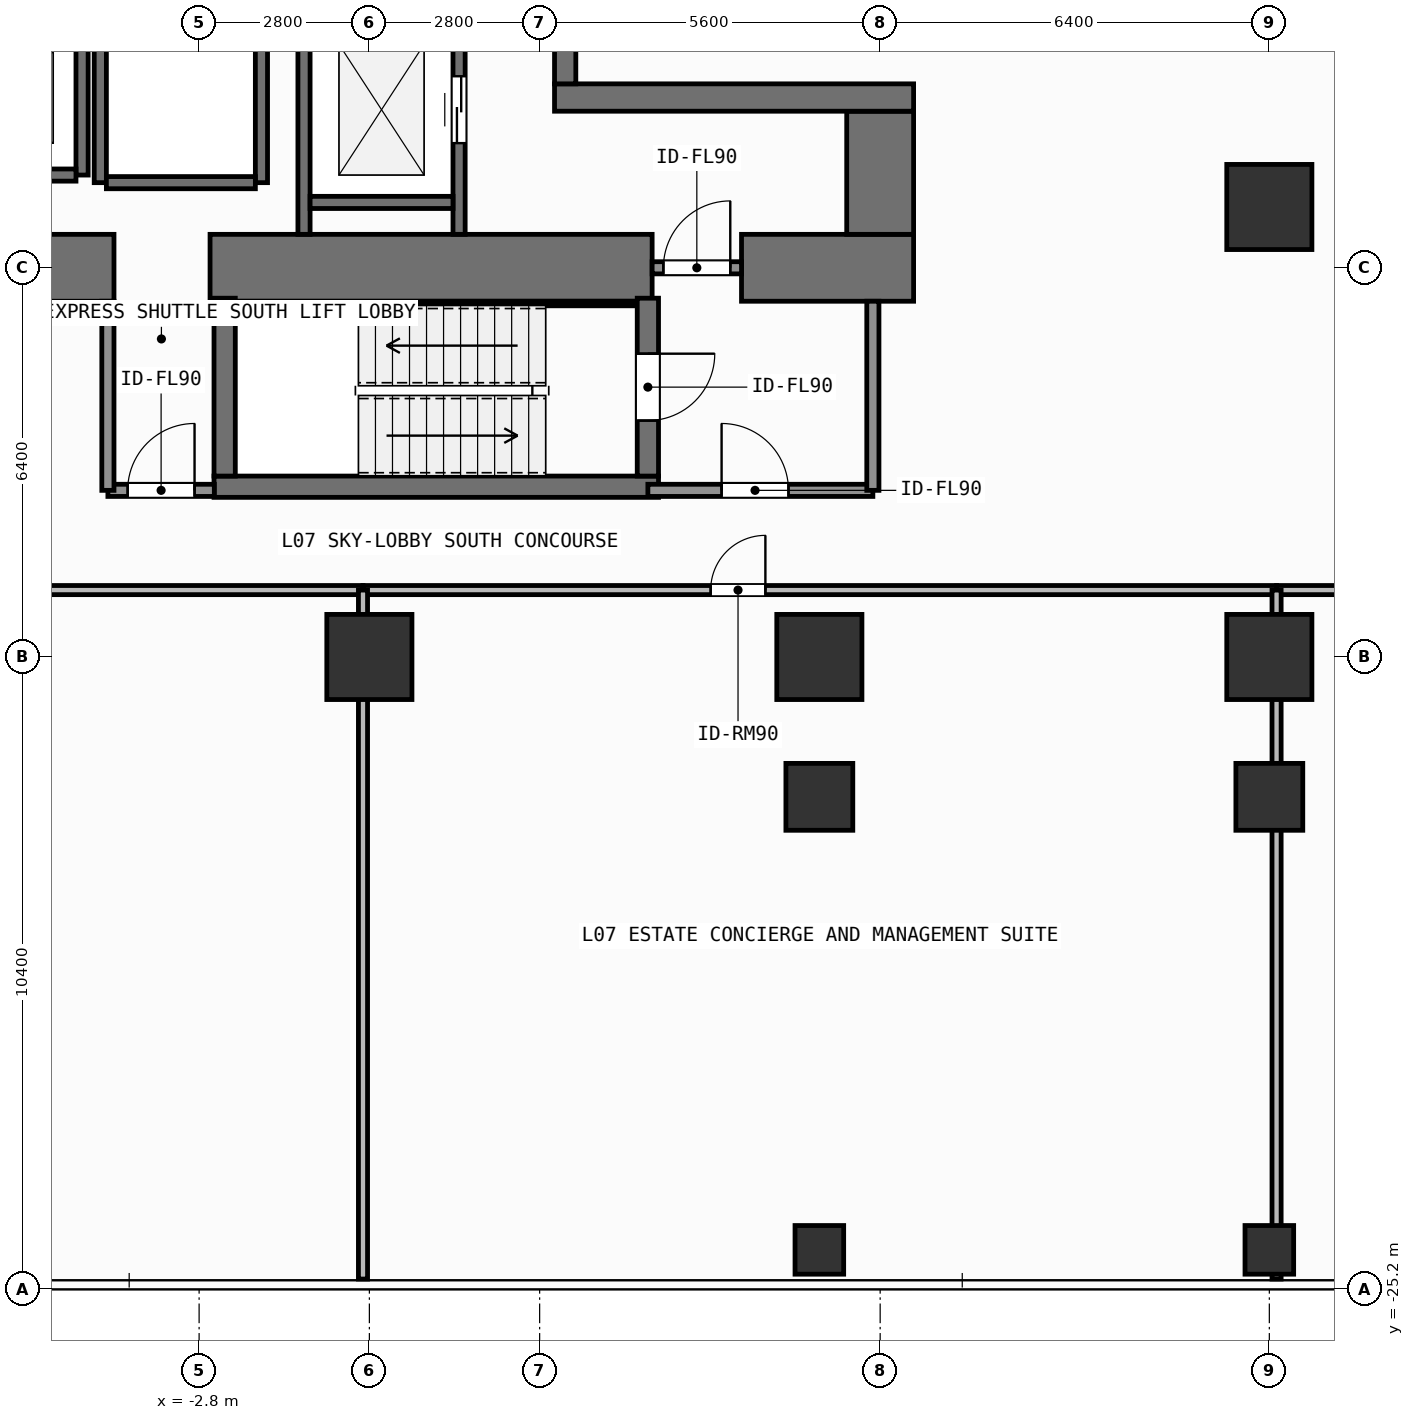
"""IFC4 building model, lengths in metres.
Left out: names, types, materials, properties, quantities, classifications, styles, units other than length and angle.
Written with IfcOpenShell. Run it as: python <this file> out.ifc"""

import sys

from ifc_helpers import new_model, si_unit, direction, frame, frame_2d, origin, origin_2d, place, context, subcontext, project, spatial, rectangle, hollow_rectangle, extrude, element, fill, save


model = new_model("IFC4")
c1 = context("Model", 3, precision=1e-05, world=origin(), true_north=direction((0.0, 1.0)))
c2 = subcontext(c1, "Body", "Model", "MODEL_VIEW")
j1 = project(units=[si_unit("LENGTHUNIT", "METRE"), si_unit("PLANEANGLEUNIT", "RADIAN")], contexts=[c1])
p1 = place(None, origin())
s1 = spatial("IfcSite", under=j1, at=p1, CompositionType="ELEMENT")
p2 = place(p1, origin())
s2 = spatial("IfcBuilding", under=s1, at=p2, CompositionType="ELEMENT")
p3 = place(p2, frame((0.0, 0.0, 26.4)))
s3 = spatial("IfcBuildingStorey", under=s2, at=p3, CompositionType="ELEMENT", Elevation=26.4)
p4 = place(p3, frame((-7.55, -8.4, 0.0), z_axis=(0.0, 0.0, 1.0), x_axis=(1.0, 0.0, 0.0)))
e1 = element("IfcWall", 1, at=p4, inside=s3, PredefinedType="SHEAR", context=c2, shape_type="SweptSolid", body=[
    extrude(rectangle(XDim=3.35, YDim=1.1, at=frame_2d((1.675, 0.0))), origin(), (0.0, 0.0, 1.0), 4.2),
])
p5 = place(p3, frame((-2.62, -8.4, 0.0), z_axis=(0.0, 0.0, 1.0), x_axis=(1.0, 0.0, 0.0)))
e2 = element("IfcWall", 2, at=p5, inside=s3, PredefinedType="SHEAR", context=c2, shape_type="SweptSolid", body=[
    extrude(rectangle(XDim=7.27, YDim=1.1, at=frame_2d((3.635, 0.0))), origin(), (0.0, 0.0, 1.0), 4.2),
])
p6 = place(p3, frame((6.12, -8.4, 0.0), z_axis=(0.0, 0.0, 1.0), x_axis=(1.0, 0.0, 0.0)))
e3 = element("IfcWall", 3, at=p6, inside=s3, PredefinedType="SHEAR", context=c2, shape_type="SweptSolid", body=[
    extrude(rectangle(XDim=2.83, YDim=1.1, at=frame_2d((1.415, 0.0))), origin(), (0.0, 0.0, 1.0), 4.2),
])
p7 = place(p3, frame((8.4, -7.85, 0.0), z_axis=(0.0, 0.0, 1.0), x_axis=(0.0, 1.0, 0.0)))
e4 = element("IfcWall", 4, at=p7, inside=s3, PredefinedType="SHEAR", context=c2, shape_type="SweptSolid", body=[
    extrude(rectangle(XDim=2.025, YDim=1.1, at=frame_2d((1.013, 0.0))), origin(), (0.0, 0.0, 1.0), 4.2),
])
p8 = place(p3, frame((3.045, -5.6, 0.0), z_axis=(0.0, 0.0, 1.0), x_axis=(1.0, 0.0, 0.0)))
e5 = element("IfcWall", 5, at=p8, inside=s3, PredefinedType="SHEAR", context=c2, shape_type="SweptSolid", body=[
    extrude(rectangle(XDim=5.905, YDim=0.45, at=frame_2d((2.953, 0.0))), origin(), (0.0, 0.0, 1.0), 4.2),
])
p9 = place(p3, frame((3.22, -5.375, 0.0), z_axis=(0.0, 0.0, 1.0), x_axis=(0.0, 1.0, 0.0)))
e6 = element("IfcWall", 6, at=p9, inside=s3, PredefinedType="SHEAR", context=c2, shape_type="SweptSolid", body=[
    extrude(rectangle(XDim=10.75, YDim=0.35, at=frame_2d((5.375, 0.0))), origin(), (0.0, 0.0, 1.0), 4.2),
])
p10 = place(p3, frame((-2.555, -12.0, 0.0), z_axis=(0.0, 0.0, 1.0), x_axis=(1.0, 0.0, 0.0)))
e7 = element("IfcWall", 7, at=p10, inside=s3, PredefinedType="SHEAR", context=c2, shape_type="SweptSolid", body=[
    extrude(rectangle(XDim=7.31, YDim=0.35, at=frame_2d((3.655, 0.0))), origin(), (0.0, 0.0, 1.0), 4.2),
])
p11 = place(p3, frame((-2.2, -8.988, 0.0), z_axis=(0.0, 0.0, 1.0), x_axis=(1.0, 0.0, 0.0)))
e8 = element("IfcWall", 8, at=p11, inside=s3, PredefinedType="SHEAR", context=c2, shape_type="SweptSolid", body=[
    extrude(rectangle(XDim=6.6, YDim=0.075, at=frame_2d((3.3, 0.0))), origin(), (0.0, 0.0, 1.0), 4.2),
])
p12 = place(p3, frame((-2.38, -11.825, 0.0), z_axis=(0.0, 0.0, 1.0), x_axis=(0.0, 1.0, 0.0)))
e9 = element("IfcWall", 9, at=p12, inside=s3, PredefinedType="SHEAR", context=c2, shape_type="SweptSolid", body=[
    extrude(rectangle(XDim=2.925, YDim=0.35, at=frame_2d((1.462, 0.0))), origin(), (0.0, 0.0, 1.0), 4.2),
])
p13 = place(p3, frame((4.58, -8.9, 0.0), z_axis=(0.0, 0.0, 1.0), x_axis=(0.0, -1.0, 0.0)))
e10 = element("IfcWall", 10, at=p13, inside=s3, PredefinedType="SHEAR", context=c2, shape_type="SweptSolid", body=[
    extrude(rectangle(XDim=2.925, YDim=0.35, at=frame_2d((1.462, 0.0))), origin(), (0.0, 0.0, 1.0), 4.2),
])
p14 = place(p13, frame((0.913, 0.0, 0.0)))
e11 = element("IfcOpeningElement", 11, at=p14, cuts=e10, PredefinedType="OPENING", context=c2, shape_type="SweptSolid", body=[
    extrude(rectangle(XDim=1.1, YDim=2.15, at=frame_2d((0.55, 1.075))), frame((0.0, 0.185, 0.0), z_axis=(0.0, -1.0, 0.0), x_axis=(1.0, 0.0, 0.0)), (0.0, 0.0, 1.0), 0.37),
])
for number, where, z_axis, x_axis in (
    (12, (0.0, -14.8, 0.0), (0.0, 0.0, 1.0), (1.0, 0.0, 0.0)),
    (13, (7.4, -14.8, 0.0), (0.0, 0.0, 1.0), (1.0, 0.0, 0.0)),
    (14, (14.8, -14.8, 0.0), (0.0, 0.0, 1.0), (1.0, 0.0, 0.0)),
    (15, (14.8, -7.4, 0.0), (0.0, 0.0, 1.0), (1.0, 0.0, 0.0)),
):
    element("IfcColumn", number, at=place(p3, frame(where, z_axis=z_axis, x_axis=x_axis)), inside=s3, PredefinedType="COLUMN", context=c2, shape_type="SweptSolid", body=[
        extrude(rectangle(XDim=1.4, YDim=1.4, at=origin_2d()), origin(), (0.0, 0.0, 1.0), 4.2),
    ])
for number, where, z_axis, x_axis in (
    (16, (7.4, -17.1, 0.0), (0.0, 0.0, 1.0), (1.0, 0.0, 0.0)),
    (17, (14.8, -17.1, 0.0), (0.0, 0.0, 1.0), (1.0, 0.0, 0.0)),
):
    element("IfcColumn", number, at=place(p3, frame(where, z_axis=z_axis, x_axis=x_axis)), inside=s3, PredefinedType="COLUMN", context=c2, shape_type="SweptSolid", body=[
        extrude(rectangle(XDim=1.1, YDim=1.1, at=origin_2d()), origin(), (0.0, 0.0, 1.0), 4.2),
    ])
for number, where, z_axis, x_axis in (
    (18, (7.4, -24.55, 0.0), (0.0, 0.0, 1.0), (1.0, 0.0, 0.0)),
    (19, (14.8, -24.55, 0.0), (0.0, 0.0, 1.0), (1.0, 0.0, 0.0)),
):
    element("IfcColumn", number, at=place(p3, frame(where, z_axis=z_axis, x_axis=x_axis)), inside=s3, PredefinedType="COLUMN", context=c2, shape_type="SweptSolid", body=[
        extrude(hollow_rectangle(XDim=0.8, YDim=0.8, WallThickness=0.036, at=origin_2d()), origin(), (0.0, 0.0, 1.0), 4.2),
    ])
p15 = place(p3, frame((-4.725, -6.875, 0.0), z_axis=(0.0, 0.0, 1.0), x_axis=(0.0, 1.0, 0.0)))
e20 = element("IfcWall", 20, at=p15, inside=s3, PredefinedType="SHEAR", context=c2, shape_type="SweptSolid", body=[
    extrude(rectangle(XDim=2.55, YDim=0.2, at=frame_2d((1.275, 0.0))), origin(), (0.0, 0.0, 1.0), 3.98),
])
p16 = place(p3, frame((-7.175, -6.875, 0.0), z_axis=(0.0, 0.0, 1.0), x_axis=(1.0, 0.0, 0.0)))
e21 = element("IfcWall", 21, at=p16, inside=s3, PredefinedType="SHEAR", context=c2, shape_type="SweptSolid", body=[
    extrude(rectangle(XDim=2.35, YDim=0.2, at=frame_2d((1.175, 0.0))), origin(), (0.0, 0.0, 1.0), 3.98),
])
for number, where, z_axis, x_axis in (
    (22, (-4.425, -7.0, 0.0), (0.0, 0.0, 1.0), (0.0, 1.0, 0.0)),
    (23, (-1.775, -7.0, 0.0), (0.0, 0.0, 1.0), (0.0, 1.0, 0.0)),
):
    element("IfcWall", number, at=place(p3, frame(where, z_axis=z_axis, x_axis=x_axis)), inside=s3, PredefinedType="SHEAR", context=c2, shape_type="SweptSolid", body=[
        extrude(rectangle(XDim=2.8, YDim=0.2, at=frame_2d((1.4, 0.0))), origin(), (0.0, 0.0, 1.0), 3.98),
    ])
p17 = place(p3, frame((-4.325, -7.0, 0.0), z_axis=(0.0, 0.0, 1.0), x_axis=(1.0, 0.0, 0.0)))
e24 = element("IfcWall", 24, at=p17, inside=s3, PredefinedType="SHEAR", context=c2, shape_type="SweptSolid", body=[
    extrude(rectangle(XDim=2.45, YDim=0.2, at=frame_2d((1.225, 0.0))), origin(), (0.0, 0.0, 1.0), 3.98),
])
p18 = place(p3, frame((-1.075, -7.85, 0.0), z_axis=(0.0, 0.0, 1.0), x_axis=(0.0, 1.0, 0.0)))
e25 = element("IfcWall", 25, at=p18, inside=s3, PredefinedType="SHEAR", context=c2, shape_type="SweptSolid", body=[
    extrude(rectangle(XDim=3.575, YDim=0.2, at=frame_2d((1.788, 0.0))), origin(), (0.0, 0.0, 1.0), 3.98),
])
p19 = place(p3, frame((1.475, -7.85, 0.0), z_axis=(0.0, 0.0, 1.0), x_axis=(0.0, 1.0, 0.0)))
e26 = element("IfcWall", 26, at=p19, inside=s3, PredefinedType="SHEAR", context=c2, shape_type="SweptSolid", body=[
    extrude(rectangle(XDim=3.575, YDim=0.2, at=frame_2d((1.788, 0.0))), origin(), (0.0, 0.0, 1.0), 3.98),
])
p20 = place(p19, frame((1.5, 0.0, 0.0)))
e27 = element("IfcOpeningElement", 27, at=p20, cuts=e26, PredefinedType="OPENING", context=c2, shape_type="SweptSolid", body=[
    extrude(rectangle(XDim=1.1, YDim=2.2, at=frame_2d((0.55, 1.1))), frame((0.0, 0.11, 0.0), z_axis=(0.0, -1.0, 0.0), x_axis=(1.0, 0.0, 0.0)), (0.0, 0.0, 1.0), 0.22),
])
p21 = place(p3, frame((-0.975, -7.325, 0.0), z_axis=(0.0, 0.0, 1.0), x_axis=(1.0, 0.0, 0.0)))
e28 = element("IfcWall", 28, at=p21, inside=s3, PredefinedType="SHEAR", context=c2, shape_type="SweptSolid", body=[
    extrude(rectangle(XDim=2.35, YDim=0.2, at=frame_2d((1.175, 0.0))), origin(), (0.0, 0.0, 1.0), 3.98),
])
p22 = place(p3, frame((4.58, -12.06, 0.0), z_axis=(0.0, 0.0, 1.0), x_axis=(1.0, 0.0, 0.0)))
e29 = element("IfcWall", 29, at=p22, inside=s3, PredefinedType="SOLIDWALL", context=c2, shape_type="SweptSolid", body=[
    extrude(rectangle(XDim=3.7, YDim=0.2, at=frame_2d((1.85, 0.0))), origin(), (0.0, 0.0, 1.0), 3.98),
])
p23 = place(p22, frame((1.212, 0.0, 0.0)))
e30 = element("IfcOpeningElement", 30, at=p23, cuts=e29, PredefinedType="OPENING", context=c2, shape_type="SweptSolid", body=[
    extrude(rectangle(XDim=1.1, YDim=2.15, at=frame_2d((0.55, 1.075))), frame((0.0, 0.11, 0.0), z_axis=(0.0, -1.0, 0.0), x_axis=(1.0, 0.0, 0.0)), (0.0, 0.0, 1.0), 0.22),
])
p24 = place(p3, frame((4.65, -8.4, 0.0), z_axis=(0.0, 0.0, 1.0), x_axis=(1.0, 0.0, 0.0)))
e31 = element("IfcWall", 31, at=p24, inside=s3, PredefinedType="SOLIDWALL", context=c2, shape_type="SweptSolid", body=[
    extrude(rectangle(XDim=1.47, YDim=0.2, at=frame_2d((0.735, 0.0))), origin(), (0.0, 0.0, 1.0), 3.02),
])
p25 = place(p24, frame((0.185, 0.0, 0.0)))
e32 = element("IfcOpeningElement", 32, at=p25, cuts=e31, PredefinedType="OPENING", context=c2, shape_type="SweptSolid", body=[
    extrude(rectangle(XDim=1.1, YDim=2.15, at=frame_2d((0.55, 1.075))), frame((0.0, 0.11, 0.0), z_axis=(0.0, -1.0, 0.0), x_axis=(1.0, 0.0, 0.0)), (0.0, 0.0, 1.0), 0.22),
])
p26 = place(p3, frame((-4.3, -12.06, 0.0), z_axis=(0.0, 0.0, 1.0), x_axis=(1.0, 0.0, 0.0)))
e33 = element("IfcWall", 33, at=p26, inside=s3, PredefinedType="SOLIDWALL", context=c2, shape_type="SweptSolid", body=[
    extrude(rectangle(XDim=1.75, YDim=0.2, at=frame_2d((0.875, 0.0))), origin(), (0.0, 0.0, 1.0), 3.98),
])
p27 = place(p26, frame((0.325, 0.0, 0.0)))
e34 = element("IfcOpeningElement", 34, at=p27, cuts=e33, PredefinedType="OPENING", context=c2, shape_type="SweptSolid", body=[
    extrude(rectangle(XDim=1.1, YDim=2.15, at=frame_2d((0.55, 1.075))), frame((0.0, 0.11, 0.0), z_axis=(0.0, -1.0, 0.0), x_axis=(1.0, 0.0, 0.0)), (0.0, 0.0, 1.0), 0.22),
])
p28 = place(p3, frame((-22.13, -13.7, 0.0), z_axis=(0.0, 0.0, 1.0), x_axis=(1.0, 0.0, 0.0)))
e35 = element("IfcWall", 35, at=p28, inside=s3, PredefinedType="PARTITIONING", context=c2, shape_type="SweptSolid", body=[
    extrude(rectangle(XDim=22.025, YDim=0.15, at=frame_2d((11.012, 0.0))), origin(), (0.0, 0.0, 1.0), 3.98),
])
p29 = place(p28, frame((12.367, 0.0, 0.0)))
e36 = element("IfcOpeningElement", 36, at=p29, cuts=e35, PredefinedType="OPENING", context=c2, shape_type="SweptSolid", body=[
    extrude(rectangle(XDim=1.6, YDim=2.3, at=frame_2d((0.8, 1.15))), frame((0.0, 0.085, 0.0), z_axis=(0.0, -1.0, 0.0), x_axis=(1.0, 0.0, 0.0)), (0.0, 0.0, 1.0), 0.17),
])
p30 = place(p3, frame((-0.105, -13.7, 0.0), z_axis=(0.0, 0.0, 1.0), x_axis=(1.0, 0.0, 0.0)))
e37 = element("IfcWall", 37, at=p30, inside=s3, PredefinedType="PARTITIONING", context=c2, shape_type="SweptSolid", body=[
    extrude(rectangle(XDim=15.024, YDim=0.15, at=frame_2d((7.512, 0.0))), origin(), (0.0, 0.0, 1.0), 3.98),
])
p31 = place(p30, frame((5.718, 0.0, 0.0)))
e38 = element("IfcOpeningElement", 38, at=p31, cuts=e37, PredefinedType="OPENING", context=c2, shape_type="SweptSolid", body=[
    extrude(rectangle(XDim=0.9, YDim=2.1, at=frame_2d((0.45, 1.05))), frame((0.0, 0.085, 0.0), z_axis=(0.0, -1.0, 0.0), x_axis=(1.0, 0.0, 0.0)), (0.0, 0.0, 1.0), 0.17),
])
p32 = place(p3, frame((14.919, -13.7, 0.0), z_axis=(0.0, 0.0, 1.0), x_axis=(1.0, 0.0, 0.0)))
e39 = element("IfcWall", 39, at=p32, inside=s3, PredefinedType="PARTITIONING", context=c2, shape_type="SweptSolid", body=[
    extrude(rectangle(XDim=13.011, YDim=0.15, at=frame_2d((6.505, 0.0))), origin(), (0.0, 0.0, 1.0), 3.98),
])
p33 = place(p32, frame((5.162, 0.0, 0.0)))
e40 = element("IfcOpeningElement", 40, at=p33, cuts=e39, PredefinedType="OPENING", context=c2, shape_type="SweptSolid", body=[
    extrude(rectangle(XDim=0.9, YDim=2.1, at=frame_2d((0.45, 1.05))), frame((0.0, 0.085, 0.0), z_axis=(0.0, -1.0, 0.0), x_axis=(1.0, 0.0, 0.0)), (0.0, 0.0, 1.0), 0.17),
])
for number, where, z_axis, x_axis in (
    (41, (8.28, -12.06, 0.0), (0.0, 0.0, 1.0), (0.0, 1.0, 0.0)),
    (42, (-4.3, -12.06, 0.0), (0.0, 0.0, 1.0), (0.0, 1.0, 0.0)),
):
    element("IfcWall", number, at=place(p3, frame(where, z_axis=z_axis, x_axis=x_axis)), inside=s3, PredefinedType="SOLIDWALL", context=c2, shape_type="SweptSolid", body=[
        extrude(rectangle(XDim=3.11, YDim=0.2, at=frame_2d((1.555, 0.0))), origin(), (0.0, 0.0, 1.0), 3.98),
    ])
p34 = place(p3, frame((-0.105, -25.03, 0.0), z_axis=(0.0, 0.0, 1.0), x_axis=(0.0, 1.0, 0.0)))
e43 = element("IfcWall", 43, at=p34, inside=s3, PredefinedType="PARTITIONING", context=c2, shape_type="SweptSolid", body=[
    extrude(rectangle(XDim=11.33, YDim=0.15, at=frame_2d((5.665, 0.0))), origin(), (0.0, 0.0, 1.0), 3.98),
])
p35 = place(p3, frame((14.919, -25.03, 0.0), z_axis=(0.0, 0.0, 1.0), x_axis=(0.0, 1.0, 0.0)))
e44 = element("IfcWall", 44, at=p35, inside=s3, PredefinedType="PARTITIONING", context=c2, shape_type="SweptSolid", body=[
    extrude(rectangle(XDim=11.33, YDim=0.15, at=frame_2d((5.665, 0.0))), origin(), (0.0, 0.0, 1.0), 3.382),
])
p36 = place(p20, origin())
e45 = element("IfcDoor", 45, at=p36, inside=s3, OperationType="SLIDING_TO_LEFT", PredefinedType="DOOR", context=c2, shape_type="SweptSolid", body=[
    extrude(rectangle(XDim=1.1, YDim=2.2, at=frame_2d((0.55, 1.1))), frame((0.0, 0.025, 0.0), z_axis=(0.0, -1.0, 0.0), x_axis=(1.0, 0.0, 0.0)), (0.0, 0.0, 1.0), 0.05),
])
fill(e27, e45)
p37 = place(p14, origin())
e46 = element("IfcDoor", 46, at=p37, inside=s3, OperationType="SINGLE_SWING_LEFT", PredefinedType="DOOR", context=c2, shape_type="SweptSolid", body=[
    extrude(rectangle(XDim=1.1, YDim=2.15, at=frame_2d((0.55, 1.075))), frame((0.0, 0.025, 0.0), z_axis=(0.0, -1.0, 0.0), x_axis=(1.0, 0.0, 0.0)), (0.0, 0.0, 1.0), 0.05),
])
fill(e11, e46)
p38 = place(p23, origin())
e47 = element("IfcDoor", 47, at=p38, inside=s3, OperationType="SINGLE_SWING_LEFT", PredefinedType="DOOR", context=c2, shape_type="SweptSolid", body=[
    extrude(rectangle(XDim=1.1, YDim=2.15, at=frame_2d((0.55, 1.075))), frame((0.0, 0.025, 0.0), z_axis=(0.0, -1.0, 0.0), x_axis=(1.0, 0.0, 0.0)), (0.0, 0.0, 1.0), 0.05),
])
fill(e30, e47)
p39 = place(p25, origin())
e48 = element("IfcDoor", 48, at=p39, inside=s3, OperationType="SINGLE_SWING_RIGHT", PredefinedType="DOOR", context=c2, shape_type="SweptSolid", body=[
    extrude(rectangle(XDim=1.1, YDim=2.15, at=frame_2d((0.55, 1.075))), frame((0.0, 0.025, 0.0), z_axis=(0.0, -1.0, 0.0), x_axis=(1.0, 0.0, 0.0)), (0.0, 0.0, 1.0), 0.05),
])
fill(e32, e48)
p40 = place(p27, origin())
e49 = element("IfcDoor", 49, at=p40, inside=s3, OperationType="SINGLE_SWING_RIGHT", PredefinedType="DOOR", context=c2, shape_type="SweptSolid", body=[
    extrude(rectangle(XDim=1.1, YDim=2.15, at=frame_2d((0.55, 1.075))), frame((0.0, 0.025, 0.0), z_axis=(0.0, -1.0, 0.0), x_axis=(1.0, 0.0, 0.0)), (0.0, 0.0, 1.0), 0.05),
])
fill(e34, e49)
p41 = place(p31, origin())
e50 = element("IfcDoor", 50, at=p41, inside=s3, OperationType="SINGLE_SWING_RIGHT", PredefinedType="DOOR", context=c2, shape_type="SweptSolid", body=[
    extrude(rectangle(XDim=0.9, YDim=2.1, at=frame_2d((0.45, 1.05))), frame((0.0, 0.025, 0.0), z_axis=(0.0, -1.0, 0.0), x_axis=(1.0, 0.0, 0.0)), (0.0, 0.0, 1.0), 0.05),
])
fill(e38, e50)
save(model, sys.argv[1])
